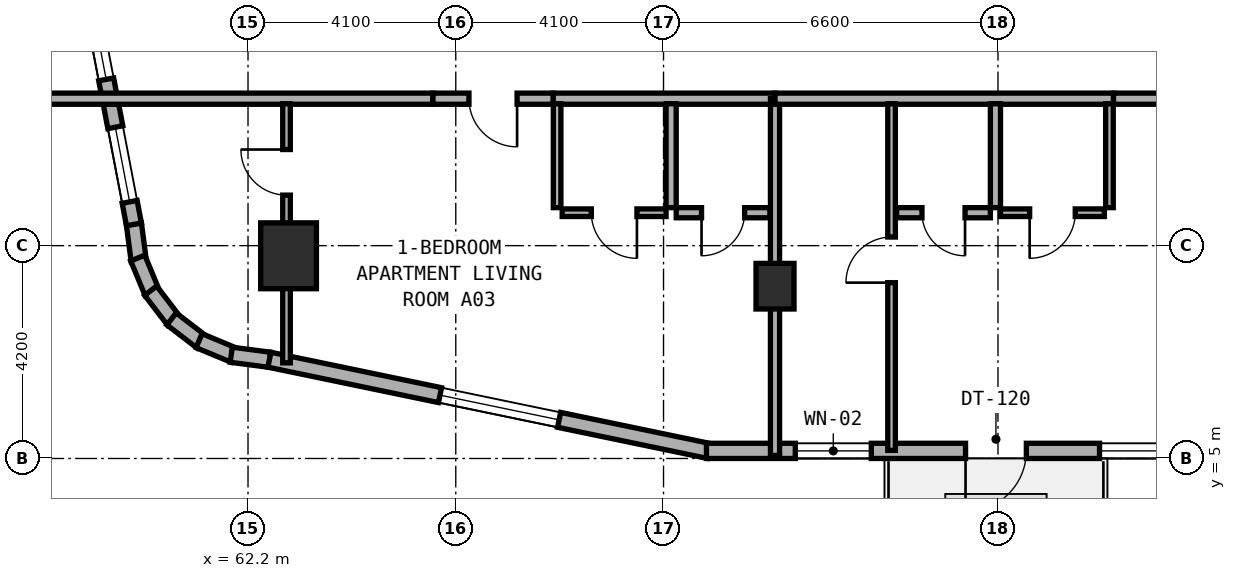
"""IFC4 building model, lengths in metres.
Left out: names, types, materials, properties, quantities, classifications, styles, units other than length and angle.
Written with IfcOpenShell. Run it as: python <this file> out.ifc"""

import sys

from ifc_helpers import new_model, si_unit, direction, frame, frame_2d, origin, origin_2d, place, context, subcontext, project, spatial, rectangle, extrude, element, fill, save


model = new_model("IFC4")
c1 = context("Model", 3, precision=1e-05, world=origin(), true_north=direction((0.0, 1.0)))
c2 = subcontext(c1, "Body", "Model", "MODEL_VIEW")
j1 = project(units=[si_unit("LENGTHUNIT", "METRE"), si_unit("PLANEANGLEUNIT", "RADIAN")], contexts=[c1])
p1 = place(None, origin())
s1 = spatial("IfcSite", under=j1, at=p1, CompositionType="ELEMENT")
p2 = place(p1, origin())
s2 = spatial("IfcBuilding", under=s1, at=p2, CompositionType="ELEMENT")
p3 = place(p2, frame((0.0, 0.0, 48.5)))
s3 = spatial("IfcBuildingStorey", under=s2, at=p3, CompositionType="ELEMENT", Elevation=48.5)
p4 = place(p3, frame((72.6, 8.4, 0.0), z_axis=(0.0, 0.0, 1.0), x_axis=(1.0, 0.0, 0.0)))
e1 = element("IfcColumn", 1, at=p4, inside=s3, PredefinedType="COLUMN", context=c2, shape_type="SweptSolid", body=[
    extrude(rectangle(XDim=0.75, YDim=0.9, at=origin_2d()), origin(), (0.0, 0.0, 1.0), 3.5),
])
p5 = place(p3, frame((63.0, 9.0, 0.0), z_axis=(0.0, 0.0, 1.0), x_axis=(1.0, 0.0, 0.0)))
e2 = element("IfcColumn", 2, at=p5, inside=s3, PredefinedType="COLUMN", context=c2, shape_type="SweptSolid", body=[
    extrude(rectangle(XDim=1.1, YDim=1.3, at=origin_2d()), origin(), (0.0, 0.0, 1.0), 3.5),
])
p6 = place(p3, frame((59.948, 9.627, 0.0), z_axis=(0.0, 0.0, 1.0), x_axis=(0.130255288807, -0.991480488834, 0.0)))
e3 = element("IfcWall", 3, at=p6, inside=s3, PredefinedType="STANDARD", context=c2, shape_type="SweptSolid", body=[
    extrude(rectangle(XDim=0.729, YDim=0.3, at=frame_2d((0.365, 0.0))), origin(), (0.0, 0.0, 1.0), 3.25),
])
for number, where, z_axis, x_axis in (
    (4, (60.024, 8.955, 0.0), (0.0, 0.0, 1.0), (0.384, -0.924, 0.0)),
    (5, (60.279, 8.311, 0.0), (0.0, 0.0, 1.0), (0.608, -0.794, 0.0)),
    (6, (60.691, 7.754, 0.0), (0.0, 0.0, 1.0), (0.794, -0.608, 0.0)),
    (7, (61.234, 7.324, 0.0), (0.0, 0.0, 1.0), (0.924, -0.383, 0.0)),
):
    element("IfcWall", number, at=place(p3, frame(where, z_axis=z_axis, x_axis=x_axis)), inside=s3, PredefinedType="STANDARD", context=c2, shape_type="SweptSolid", body=[
        extrude(rectangle(XDim=0.746, YDim=0.3, at=frame_2d((0.373, 0.0))), origin(), (0.0, 0.0, 1.0), 3.25),
    ])
p7 = place(p3, frame((61.869, 7.047, 0.0), z_axis=(0.0, 0.0, 1.0), x_axis=(0.991559404866, -0.129653178221, 0.0)))
e8 = element("IfcWall", 8, at=p7, inside=s3, PredefinedType="STANDARD", context=c2, shape_type="SweptSolid", body=[
    extrude(rectangle(XDim=0.764, YDim=0.3, at=frame_2d((0.382, 0.0))), origin(), (0.0, 0.0, 1.0), 3.25),
])
p8 = place(p3, frame((62.622, 6.949, 0.0), z_axis=(0.0, 0.0, 1.0), x_axis=(0.979119654102, -0.203284782882, 0.0)))
e9 = element("IfcWall", 9, at=p8, inside=s3, PredefinedType="STANDARD", context=c2, shape_type="SweptSolid", body=[
    extrude(rectangle(XDim=8.855, YDim=0.3, at=frame_2d((4.427, 0.0))), origin(), (0.0, 0.0, 1.0), 3.25),
])
p9 = place(p8, frame((3.439, 0.0, 0.8)))
e10 = element("IfcOpeningElement", 10, at=p9, cuts=e9, PredefinedType="OPENING", context=c2, shape_type="SweptSolid", body=[
    extrude(rectangle(XDim=2.4, YDim=1.6, at=frame_2d((1.2, 0.8))), frame((0.0, 0.16, 0.0), z_axis=(0.0, -1.0, 0.0), x_axis=(1.0, 0.0, 0.0)), (0.0, 0.0, 1.0), 0.32),
])
p10 = place(p3, frame((71.247, 5.15, 0.0), z_axis=(0.0, 0.0, 1.0), x_axis=(1.0, 0.0, 0.0)))
e11 = element("IfcWall", 11, at=p10, inside=s3, PredefinedType="STANDARD", context=c2, shape_type="SweptSolid", body=[
    extrude(rectangle(XDim=11.391, YDim=0.3, at=frame_2d((5.695, 0.0))), origin(), (0.0, 0.0, 1.0), 3.25),
])
p11 = place(p10, frame((5.113, 0.0, 0.0)))
e12 = element("IfcOpeningElement", 12, at=p11, cuts=e11, PredefinedType="OPENING", context=c2, shape_type="SweptSolid", body=[
    extrude(rectangle(XDim=1.2, YDim=2.15, at=frame_2d((0.6, 1.075))), frame((0.0, 0.16, 0.0), z_axis=(0.0, -1.0, 0.0), x_axis=(1.0, 0.0, 0.0)), (0.0, 0.0, 1.0), 0.32),
])
p12 = place(p10, frame((1.753, 0.0, 0.85)))
e13 = element("IfcOpeningElement", 13, at=p12, cuts=e11, PredefinedType="OPENING", context=c2, shape_type="SweptSolid", body=[
    extrude(rectangle(XDim=1.5, YDim=1.5, at=frame_2d((0.75, 0.75))), frame((0.0, 0.16, 0.0), z_axis=(0.0, -1.0, 0.0), x_axis=(1.0, 0.0, 0.0)), (0.0, 0.0, 1.0), 0.32),
])
p13 = place(p10, frame((7.757, 0.0, 0.8)))
e14 = element("IfcOpeningElement", 14, at=p13, cuts=e11, PredefinedType="OPENING", context=c2, shape_type="SweptSolid", body=[
    extrude(rectangle(XDim=2.4, YDim=1.6, at=frame_2d((1.2, 0.8))), frame((0.0, 0.16, 0.0), z_axis=(0.0, -1.0, 0.0), x_axis=(1.0, 0.0, 0.0)), (0.0, 0.0, 1.0), 0.32),
])
p14 = place(p3, frame((58.137, 19.082, 0.0), z_axis=(0.0, 0.0, 1.0), x_axis=(0.188087874316, -0.982152203854, 0.0)))
e15 = element("IfcWall", 15, at=p14, inside=s3, PredefinedType="STANDARD", context=c2, shape_type="SweptSolid", body=[
    extrude(rectangle(XDim=9.634, YDim=0.3, at=frame_2d((4.817, 0.0))), origin(), (0.0, 0.0, 1.0), 3.25),
])
p15 = place(p14, frame((1.306, 0.0, 0.8)))
e16 = element("IfcOpeningElement", 16, at=p15, cuts=e15, PredefinedType="OPENING", context=c2, shape_type="SweptSolid", body=[
    extrude(rectangle(XDim=2.4, YDim=1.6, at=frame_2d((1.2, 0.8))), frame((0.0, 0.16, 0.0), z_axis=(0.0, -1.0, 0.0), x_axis=(1.0, 0.0, 0.0)), (0.0, 0.0, 1.0), 0.32),
])
p16 = place(p14, frame((5.521, 0.0, 0.85)))
e17 = element("IfcOpeningElement", 17, at=p16, cuts=e15, PredefinedType="OPENING", context=c2, shape_type="SweptSolid", body=[
    extrude(rectangle(XDim=1.2, YDim=1.5, at=frame_2d((0.6, 0.75))), frame((0.0, 0.16, 0.0), z_axis=(0.0, -1.0, 0.0), x_axis=(1.0, 0.0, 0.0)), (0.0, 0.0, 1.0), 0.32),
])
p17 = place(p14, frame((7.682, 0.0, 0.85)))
e18 = element("IfcOpeningElement", 18, at=p17, cuts=e15, PredefinedType="OPENING", context=c2, shape_type="SweptSolid", body=[
    extrude(rectangle(XDim=1.5, YDim=1.5, at=frame_2d((0.75, 0.75))), frame((0.0, 0.16, 0.0), z_axis=(0.0, -1.0, 0.0), x_axis=(1.0, 0.0, 0.0)), (0.0, 0.0, 1.0), 0.32),
])
p18 = place(p3, frame((58.16, 12.1, 0.0), z_axis=(0.0, 0.0, 1.0), x_axis=(1.0, 0.0, 0.0)))
e19 = element("IfcWall", 19, at=p18, inside=s3, PredefinedType="SOLIDWALL", context=c2, shape_type="SweptSolid", body=[
    extrude(rectangle(XDim=7.69, YDim=0.22, at=frame_2d((3.845, 0.0))), origin(), (0.0, 0.0, 1.0), 2.865),
])
p19 = place(p3, frame((68.22, 12.1, 0.0), z_axis=(0.0, 0.0, 1.0), x_axis=(1.0, 0.0, 0.0)))
e20 = element("IfcWall", 20, at=p19, inside=s3, PredefinedType="SOLIDWALL", context=c2, shape_type="SweptSolid", body=[
    extrude(rectangle(XDim=4.38, YDim=0.22, at=frame_2d((2.19, 0.0))), origin(), (0.0, 0.0, 1.0), 2.725),
])
p20 = place(p3, frame((65.85, 12.1, 0.0), z_axis=(0.0, 0.0, 1.0), x_axis=(1.0, 0.0, 0.0)))
e21 = element("IfcWall", 21, at=p20, inside=s3, PredefinedType="SOLIDWALL", context=c2, shape_type="SweptSolid", body=[
    extrude(rectangle(XDim=2.37, YDim=0.22, at=frame_2d((1.185, 0.0))), origin(), (0.0, 0.0, 1.0), 3.22),
])
p21 = place(p20, frame((0.71, 0.0, 0.0)))
e22 = element("IfcOpeningElement", 22, at=p21, cuts=e21, PredefinedType="OPENING", context=c2, shape_type="SweptSolid", body=[
    extrude(rectangle(XDim=0.95, YDim=2.1, at=frame_2d((0.475, 1.05))), frame((0.0, 0.12, 0.0), z_axis=(0.0, -1.0, 0.0), x_axis=(1.0, 0.0, 0.0)), (0.0, 0.0, 1.0), 0.24),
])
p22 = place(p3, frame((62.96, 6.887, 0.0), z_axis=(0.0, 0.0, 1.0), x_axis=(0.0, 1.0, 0.0)))
e23 = element("IfcWall", 23, at=p22, inside=s3, PredefinedType="PARTITIONING", context=c2, shape_type="SweptSolid", body=[
    extrude(rectangle(XDim=5.113, YDim=0.15, at=frame_2d((2.557, 0.0))), origin(), (0.0, 0.0, 1.0), 2.865),
])
p23 = place(p22, frame((3.31, 0.0, 0.0)))
e24 = element("IfcOpeningElement", 24, at=p23, cuts=e23, PredefinedType="OPENING", context=c2, shape_type="SweptSolid", body=[
    extrude(rectangle(XDim=0.9, YDim=2.1, at=frame_2d((0.45, 1.05))), frame((0.0, 0.085, 0.0), z_axis=(0.0, -1.0, 0.0), x_axis=(1.0, 0.0, 0.0)), (0.0, 0.0, 1.0), 0.17),
])
p24 = place(p3, frame((70.55, 9.95, 0.0), z_axis=(0.0, 0.0, 1.0), x_axis=(0.0, 1.0, 0.0)))
e25 = element("IfcWall", 25, at=p24, inside=s3, PredefinedType="PLUMBINGWALL", context=c2, shape_type="SweptSolid", body=[
    extrude(rectangle(XDim=2.05, YDim=0.2, at=frame_2d((1.025, 0.0))), origin(), (0.0, 0.0, 1.0), 3.22),
])
p25 = place(p3, frame((68.3, 9.95, 0.0), z_axis=(0.0, 0.0, 1.0), x_axis=(0.0, 1.0, 0.0)))
e26 = element("IfcWall", 26, at=p25, inside=s3, PredefinedType="PARTITIONING", context=c2, shape_type="SweptSolid", body=[
    extrude(rectangle(XDim=2.05, YDim=0.15, at=frame_2d((1.025, 0.0))), origin(), (0.0, 0.0, 1.0), 3.22),
])
p26 = place(p3, frame((70.65, 9.85, 0.0), z_axis=(0.0, 0.0, 1.0), x_axis=(1.0, 0.0, 0.0)))
e27 = element("IfcWall", 27, at=p26, inside=s3, PredefinedType="PLUMBINGWALL", context=c2, shape_type="SweptSolid", body=[
    extrude(rectangle(XDim=1.85, YDim=0.2, at=frame_2d((0.925, 0.0))), origin(), (0.0, 0.0, 1.0), 3.22),
])
p27 = place(p26, frame((0.5, 0.0, 0.0)))
e28 = element("IfcOpeningElement", 28, at=p27, cuts=e27, PredefinedType="OPENING", context=c2, shape_type="SweptSolid", body=[
    extrude(rectangle(XDim=0.85, YDim=2.1, at=frame_2d((0.425, 1.05))), frame((0.0, 0.11, 0.0), z_axis=(0.0, -1.0, 0.0), x_axis=(1.0, 0.0, 0.0)), (0.0, 0.0, 1.0), 0.22),
])
p28 = place(p3, frame((68.4, 9.85, 0.0), z_axis=(0.0, 0.0, 1.0), x_axis=(1.0, 0.0, 0.0)))
e29 = element("IfcWall", 29, at=p28, inside=s3, PredefinedType="PARTITIONING", context=c2, shape_type="SweptSolid", body=[
    extrude(rectangle(XDim=2.05, YDim=0.15, at=frame_2d((1.025, 0.0))), origin(), (0.0, 0.0, 1.0), 3.22),
])
p29 = place(p28, frame((0.575, 0.0, 0.0)))
e30 = element("IfcOpeningElement", 30, at=p29, cuts=e29, PredefinedType="OPENING", context=c2, shape_type="SweptSolid", body=[
    extrude(rectangle(XDim=0.9, YDim=2.1, at=frame_2d((0.45, 1.05))), frame((0.0, 0.085, 0.0), z_axis=(0.0, -1.0, 0.0), x_axis=(1.0, 0.0, 0.0)), (0.0, 0.0, 1.0), 0.17),
])
p30 = place(p3, frame((72.6, 5.06, 0.0), z_axis=(0.0, 0.0, 1.0), x_axis=(0.0, 1.0, 0.0)))
e31 = element("IfcWall", 31, at=p30, inside=s3, PredefinedType="SOLIDWALL", context=c2, shape_type="SweptSolid", body=[
    extrude(rectangle(XDim=7.04, YDim=0.18, at=frame_2d((3.52, 0.0))), origin(), (0.0, 0.0, 1.0), 2.725),
])
p31 = place(p3, frame((72.6, 12.1, 0.0), z_axis=(0.0, 0.0, 1.0), x_axis=(1.0, 0.0, 0.0)))
e32 = element("IfcWall", 32, at=p31, inside=s3, PredefinedType="SOLIDWALL", context=c2, shape_type="SweptSolid", body=[
    extrude(rectangle(XDim=6.68, YDim=0.22, at=frame_2d((3.34, 0.0))), origin(), (0.0, 0.0, 1.0), 2.725),
])
p32 = place(p3, frame((79.28, 12.1, 0.0), z_axis=(0.0, 0.0, 1.0), x_axis=(1.0, 0.0, 0.0)))
e33 = element("IfcWall", 33, at=p32, inside=s3, PredefinedType="SOLIDWALL", context=c2, shape_type="SweptSolid", body=[
    extrude(rectangle(XDim=9.07, YDim=0.22, at=frame_2d((4.535, 0.0))), origin(), (0.0, 0.0, 1.0), 2.725),
])
p33 = place(p32, frame((4.06, 0.0, 0.0)))
e34 = element("IfcOpeningElement", 34, at=p33, cuts=e33, PredefinedType="OPENING", context=c2, shape_type="SweptSolid", body=[
    extrude(rectangle(XDim=0.95, YDim=2.1, at=frame_2d((0.475, 1.05))), frame((0.0, 0.12, 0.0), z_axis=(0.0, -1.0, 0.0), x_axis=(1.0, 0.0, 0.0)), (0.0, 0.0, 1.0), 0.24),
])
p34 = place(p3, frame((74.9, 5.16, 0.0), z_axis=(0.0, 0.0, 1.0), x_axis=(0.0, 1.0, 0.0)))
e35 = element("IfcWall", 35, at=p34, inside=s3, PredefinedType="PARTITIONING", context=c2, shape_type="SweptSolid", body=[
    extrude(rectangle(XDim=6.84, YDim=0.15, at=frame_2d((3.42, 0.0))), origin(), (0.0, 0.0, 1.0), 2.865),
])
p35 = place(p34, frame((3.31, 0.0, 0.0)))
e36 = element("IfcOpeningElement", 36, at=p35, cuts=e35, PredefinedType="OPENING", context=c2, shape_type="SweptSolid", body=[
    extrude(rectangle(XDim=0.9, YDim=2.1, at=frame_2d((0.45, 1.05))), frame((0.0, 0.085, 0.0), z_axis=(0.0, -1.0, 0.0), x_axis=(1.0, 0.0, 0.0)), (0.0, 0.0, 1.0), 0.17),
])
p36 = place(p3, frame((76.95, 9.95, 0.0), z_axis=(0.0, 0.0, 1.0), x_axis=(0.0, 1.0, 0.0)))
e37 = element("IfcWall", 37, at=p36, inside=s3, PredefinedType="PLUMBINGWALL", context=c2, shape_type="SweptSolid", body=[
    extrude(rectangle(XDim=2.05, YDim=0.2, at=frame_2d((1.025, 0.0))), origin(), (0.0, 0.0, 1.0), 2.985),
])
p37 = place(p3, frame((79.2, 9.95, 0.0), z_axis=(0.0, 0.0, 1.0), x_axis=(0.0, 1.0, 0.0)))
e38 = element("IfcWall", 38, at=p37, inside=s3, PredefinedType="PARTITIONING", context=c2, shape_type="SweptSolid", body=[
    extrude(rectangle(XDim=2.05, YDim=0.15, at=frame_2d((1.025, 0.0))), origin(), (0.0, 0.0, 1.0), 2.985),
])
p38 = place(p3, frame((75.0, 9.85, 0.0), z_axis=(0.0, 0.0, 1.0), x_axis=(1.0, 0.0, 0.0)))
e39 = element("IfcWall", 39, at=p38, inside=s3, PredefinedType="PLUMBINGWALL", context=c2, shape_type="SweptSolid", body=[
    extrude(rectangle(XDim=1.85, YDim=0.2, at=frame_2d((0.925, 0.0))), origin(), (0.0, 0.0, 1.0), 3.22),
])
p39 = place(p38, frame((0.5, 0.0, 0.0)))
e40 = element("IfcOpeningElement", 40, at=p39, cuts=e39, PredefinedType="OPENING", context=c2, shape_type="SweptSolid", body=[
    extrude(rectangle(XDim=0.85, YDim=2.1, at=frame_2d((0.425, 1.05))), frame((0.0, 0.11, 0.0), z_axis=(0.0, -1.0, 0.0), x_axis=(1.0, 0.0, 0.0)), (0.0, 0.0, 1.0), 0.22),
])
p40 = place(p3, frame((77.05, 9.85, 0.0), z_axis=(0.0, 0.0, 1.0), x_axis=(1.0, 0.0, 0.0)))
e41 = element("IfcWall", 41, at=p40, inside=s3, PredefinedType="PARTITIONING", context=c2, shape_type="SweptSolid", body=[
    extrude(rectangle(XDim=2.05, YDim=0.15, at=frame_2d((1.025, 0.0))), origin(), (0.0, 0.0, 1.0), 3.22),
])
p41 = place(p40, frame((0.575, 0.0, 0.0)))
e42 = element("IfcOpeningElement", 42, at=p41, cuts=e41, PredefinedType="OPENING", context=c2, shape_type="SweptSolid", body=[
    extrude(rectangle(XDim=0.9, YDim=2.1, at=frame_2d((0.45, 1.05))), frame((0.0, 0.085, 0.0), z_axis=(0.0, -1.0, 0.0), x_axis=(1.0, 0.0, 0.0)), (0.0, 0.0, 1.0), 0.17),
])
p42 = place(p9, origin())
e43 = element("IfcWindow", 43, at=p42, inside=s3, PartitioningType="SINGLE_PANEL", PredefinedType="WINDOW", context=c2, shape_type="SweptSolid", body=[
    extrude(rectangle(XDim=2.4, YDim=1.6, at=frame_2d((1.2, 0.8))), frame((0.0, 0.03, 0.0), z_axis=(0.0, -1.0, 0.0), x_axis=(1.0, 0.0, 0.0)), (0.0, 0.0, 1.0), 0.06),
])
fill(e10, e43)
p43 = place(p11, frame((1.2, 0.0, 0.0), z_axis=(0.0, 0.0, 1.0), x_axis=(-1.0, 0.0, 0.0)))
e44 = element("IfcDoor", 44, at=p43, inside=s3, OperationType="SINGLE_SWING_RIGHT", PredefinedType="DOOR", context=c2, shape_type="SweptSolid", body=[
    extrude(rectangle(XDim=1.2, YDim=2.15, at=frame_2d((0.6, 1.075))), frame((0.0, 0.025, 0.0), z_axis=(0.0, -1.0, 0.0), x_axis=(1.0, 0.0, 0.0)), (0.0, 0.0, 1.0), 0.05),
])
fill(e12, e44)
p44 = place(p12, origin())
e45 = element("IfcWindow", 45, at=p44, inside=s3, PartitioningType="SINGLE_PANEL", PredefinedType="WINDOW", context=c2, shape_type="SweptSolid", body=[
    extrude(rectangle(XDim=1.5, YDim=1.5, at=frame_2d((0.75, 0.75))), frame((0.0, 0.03, 0.0), z_axis=(0.0, -1.0, 0.0), x_axis=(1.0, 0.0, 0.0)), (0.0, 0.0, 1.0), 0.06),
])
fill(e13, e45)
p45 = place(p13, origin())
e46 = element("IfcWindow", 46, at=p45, inside=s3, PartitioningType="SINGLE_PANEL", PredefinedType="WINDOW", context=c2, shape_type="SweptSolid", body=[
    extrude(rectangle(XDim=2.4, YDim=1.6, at=frame_2d((1.2, 0.8))), frame((0.0, 0.03, 0.0), z_axis=(0.0, -1.0, 0.0), x_axis=(1.0, 0.0, 0.0)), (0.0, 0.0, 1.0), 0.06),
])
fill(e14, e46)
p46 = place(p16, origin())
e47 = element("IfcWindow", 47, at=p46, inside=s3, PartitioningType="SINGLE_PANEL", PredefinedType="WINDOW", context=c2, shape_type="SweptSolid", body=[
    extrude(rectangle(XDim=1.2, YDim=1.5, at=frame_2d((0.6, 0.75))), frame((0.0, 0.03, 0.0), z_axis=(0.0, -1.0, 0.0), x_axis=(1.0, 0.0, 0.0)), (0.0, 0.0, 1.0), 0.06),
])
fill(e17, e47)
p47 = place(p17, origin())
e48 = element("IfcWindow", 48, at=p47, inside=s3, PartitioningType="SINGLE_PANEL", PredefinedType="WINDOW", context=c2, shape_type="SweptSolid", body=[
    extrude(rectangle(XDim=1.5, YDim=1.5, at=frame_2d((0.75, 0.75))), frame((0.0, 0.03, 0.0), z_axis=(0.0, -1.0, 0.0), x_axis=(1.0, 0.0, 0.0)), (0.0, 0.0, 1.0), 0.06),
])
fill(e18, e48)
p48 = place(p21, frame((0.95, 0.0, 0.0), z_axis=(0.0, 0.0, 1.0), x_axis=(-1.0, 0.0, 0.0)))
e49 = element("IfcDoor", 49, at=p48, inside=s3, OperationType="SINGLE_SWING_LEFT", PredefinedType="DOOR", context=c2, shape_type="SweptSolid", body=[
    extrude(rectangle(XDim=0.95, YDim=2.1, at=frame_2d((0.475, 1.05))), frame((0.0, 0.025, 0.0), z_axis=(0.0, -1.0, 0.0), x_axis=(1.0, 0.0, 0.0)), (0.0, 0.0, 1.0), 0.05),
])
fill(e22, e49)
p49 = place(p23, origin())
e50 = element("IfcDoor", 50, at=p49, inside=s3, OperationType="SINGLE_SWING_RIGHT", PredefinedType="DOOR", context=c2, shape_type="SweptSolid", body=[
    extrude(rectangle(XDim=0.9, YDim=2.1, at=frame_2d((0.45, 1.05))), frame((0.0, 0.025, 0.0), z_axis=(0.0, -1.0, 0.0), x_axis=(1.0, 0.0, 0.0)), (0.0, 0.0, 1.0), 0.05),
])
fill(e24, e50)
p50 = place(p27, frame((0.85, 0.0, 0.0), z_axis=(0.0, 0.0, 1.0), x_axis=(-1.0, 0.0, 0.0)))
e51 = element("IfcDoor", 51, at=p50, inside=s3, OperationType="SINGLE_SWING_RIGHT", PredefinedType="DOOR", context=c2, shape_type="SweptSolid", body=[
    extrude(rectangle(XDim=0.85, YDim=2.1, at=frame_2d((0.425, 1.05))), frame((0.0, 0.025, 0.0), z_axis=(0.0, -1.0, 0.0), x_axis=(1.0, 0.0, 0.0)), (0.0, 0.0, 1.0), 0.05),
])
fill(e28, e51)
p51 = place(p29, frame((0.9, 0.0, 0.0), z_axis=(0.0, 0.0, 1.0), x_axis=(-1.0, 0.0, 0.0)))
e52 = element("IfcDoor", 52, at=p51, inside=s3, OperationType="SINGLE_SWING_LEFT", PredefinedType="DOOR", context=c2, shape_type="SweptSolid", body=[
    extrude(rectangle(XDim=0.9, YDim=2.1, at=frame_2d((0.45, 1.05))), frame((0.0, 0.025, 0.0), z_axis=(0.0, -1.0, 0.0), x_axis=(1.0, 0.0, 0.0)), (0.0, 0.0, 1.0), 0.05),
])
fill(e30, e52)
p52 = place(p35, origin())
e53 = element("IfcDoor", 53, at=p52, inside=s3, OperationType="SINGLE_SWING_LEFT", PredefinedType="DOOR", context=c2, shape_type="SweptSolid", body=[
    extrude(rectangle(XDim=0.9, YDim=2.1, at=frame_2d((0.45, 1.05))), frame((0.0, 0.025, 0.0), z_axis=(0.0, -1.0, 0.0), x_axis=(1.0, 0.0, 0.0)), (0.0, 0.0, 1.0), 0.05),
])
fill(e36, e53)
p53 = place(p39, frame((0.85, 0.0, 0.0), z_axis=(0.0, 0.0, 1.0), x_axis=(-1.0, 0.0, 0.0)))
e54 = element("IfcDoor", 54, at=p53, inside=s3, OperationType="SINGLE_SWING_LEFT", PredefinedType="DOOR", context=c2, shape_type="SweptSolid", body=[
    extrude(rectangle(XDim=0.85, YDim=2.1, at=frame_2d((0.425, 1.05))), frame((0.0, 0.025, 0.0), z_axis=(0.0, -1.0, 0.0), x_axis=(1.0, 0.0, 0.0)), (0.0, 0.0, 1.0), 0.05),
])
fill(e40, e54)
p54 = place(p41, frame((0.9, 0.0, 0.0), z_axis=(0.0, 0.0, 1.0), x_axis=(-1.0, 0.0, 0.0)))
e55 = element("IfcDoor", 55, at=p54, inside=s3, OperationType="SINGLE_SWING_RIGHT", PredefinedType="DOOR", context=c2, shape_type="SweptSolid", body=[
    extrude(rectangle(XDim=0.9, YDim=2.1, at=frame_2d((0.45, 1.05))), frame((0.0, 0.025, 0.0), z_axis=(0.0, -1.0, 0.0), x_axis=(1.0, 0.0, 0.0)), (0.0, 0.0, 1.0), 0.05),
])
fill(e42, e55)
save(model, sys.argv[1])
